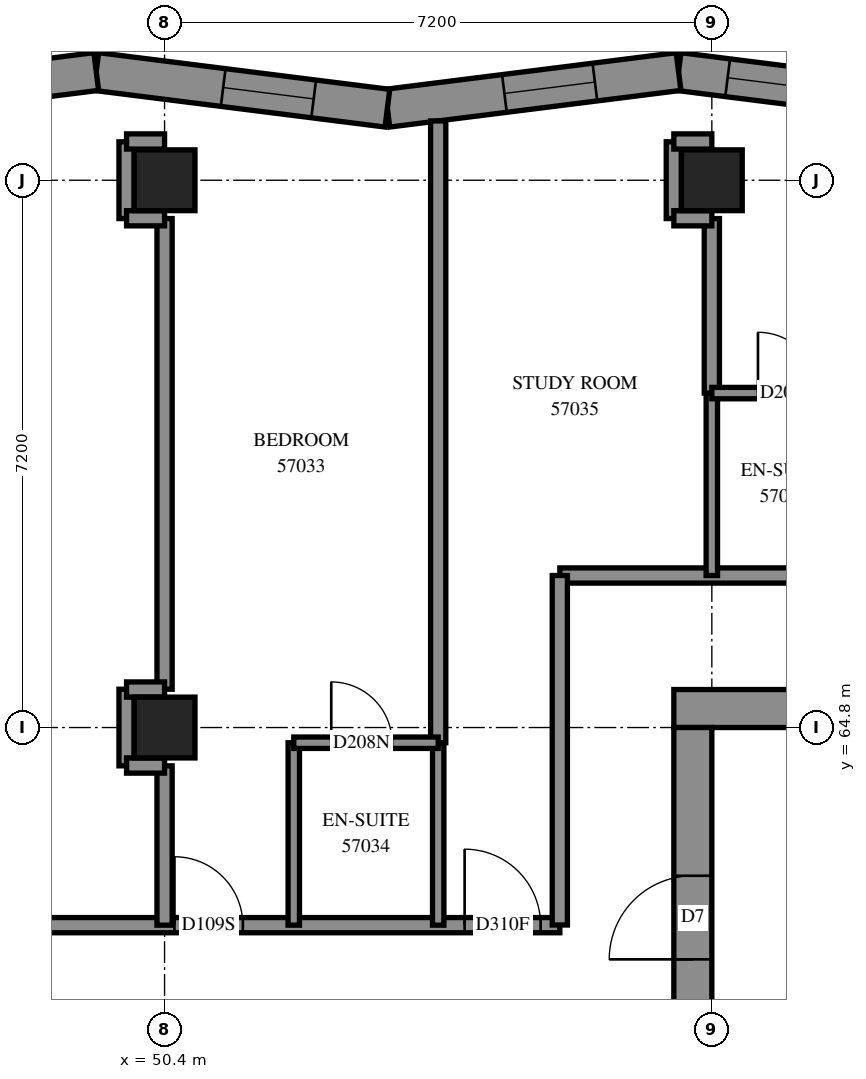
"""IFC4 building model, lengths in metres.
Left out: names, types, materials, properties, quantities, classifications, styles, units other than length and angle.
Written with IfcOpenShell. Run it as: python <this file> out.ifc"""

import sys

from ifc_helpers import new_model, si_unit, direction, frame, frame_2d, origin, origin_2d, place, context, subcontext, project, spatial, polyline, rectangle, outline, extrude, element, fill, save


model = new_model("IFC4")
c1 = context("Model", 3, precision=1e-05, world=origin(), true_north=direction((0.0, 1.0)))
c2 = subcontext(c1, "Body", "Model", "MODEL_VIEW")
j1 = project(units=[si_unit("LENGTHUNIT", "METRE"), si_unit("PLANEANGLEUNIT", "RADIAN")], contexts=[c1])
p1 = place(None, origin())
s1 = spatial("IfcSite", under=j1, at=p1, CompositionType="ELEMENT")
p2 = place(p1, origin())
s2 = spatial("IfcBuilding", under=s1, at=p2, CompositionType="ELEMENT")
p3 = place(p2, frame((0.0, 0.0, 210.0)))
s3 = spatial("IfcBuildingStorey", under=s2, at=p3, CompositionType="ELEMENT", Elevation=210.0)
for number, where, z_axis, x_axis in (
    (1, (50.4, 64.8, 0.0), (0.0, 0.0, 1.0), (1.0, 0.0, 0.0)),
    (2, (50.4, 72.0, 0.0), (0.0, 0.0, 1.0), (1.0, 0.0, 0.0)),
    (3, (57.6, 72.0, 0.0), (0.0, 0.0, 1.0), (1.0, 0.0, 0.0)),
):
    element("IfcColumn", number, at=place(p3, frame(where, z_axis=z_axis, x_axis=x_axis)), inside=s3, PredefinedType="COLUMN", context=c2, shape_type="SweptSolid", body=[
        extrude(rectangle(XDim=0.8, YDim=0.8, at=origin_2d()), origin(), (0.0, 0.0, 1.0), 3.1),
    ])
p4 = place(p3, frame((57.1, 65.05, -0.3), z_axis=(0.0, 0.0, 1.0), x_axis=(1.0, 0.0, 0.0)))
e4 = element("IfcWall", 4, at=p4, inside=s3, PredefinedType="SHEAR", context=c2, shape_type="SweptSolid", body=[
    extrude(rectangle(XDim=15.4, YDim=0.5, at=frame_2d((7.7, 0.0))), origin(), (0.0, 0.0, 1.0), 2.7),
])
p5 = place(p4, frame((10.5, 0.0, 0.3)))
e5 = element("IfcOpeningElement", 5, at=p5, cuts=e4, PredefinedType="OPENING", context=c2, shape_type="SweptSolid", body=[
    extrude(rectangle(XDim=0.8, YDim=2.1, at=frame_2d((0.4, 1.05))), frame((0.0, 0.26, 0.0), z_axis=(0.0, -1.0, 0.0), x_axis=(1.0, 0.0, 0.0)), (0.0, 0.0, 1.0), 0.52),
])
p6 = place(p3, frame((57.35, 50.4, -0.3), z_axis=(0.0, 0.0, 1.0), x_axis=(0.0, 1.0, 0.0)))
e6 = element("IfcWall", 6, at=p6, inside=s3, PredefinedType="SHEAR", context=c2, shape_type="SweptSolid", body=[
    extrude(rectangle(XDim=14.4, YDim=0.5, at=frame_2d((7.2, 0.0))), origin(), (0.0, 0.0, 1.0), 2.7),
])
p7 = place(p6, frame((4.55, 0.0, 0.3)))
e7 = element("IfcOpeningElement", 7, at=p7, cuts=e6, PredefinedType="OPENING", context=c2, shape_type="SweptSolid", body=[
    extrude(rectangle(XDim=1.1, YDim=2.1, at=frame_2d((0.55, 1.05))), frame((0.0, 0.26, 0.0), z_axis=(0.0, -1.0, 0.0), x_axis=(1.0, 0.0, 0.0)), (0.0, 0.0, 1.0), 0.52),
])
p8 = place(p6, frame((11.35, 0.0, 0.3)))
e8 = element("IfcOpeningElement", 8, at=p8, cuts=e6, PredefinedType="OPENING", context=c2, shape_type="SweptSolid", body=[
    extrude(rectangle(XDim=1.1, YDim=2.1, at=frame_2d((0.55, 1.05))), frame((0.0, 0.26, 0.0), z_axis=(0.0, -1.0, 0.0), x_axis=(1.0, 0.0, 0.0)), (0.0, 0.0, 1.0), 0.52),
])
p9 = place(p3, frame((60.993, 72.948, 0.0), z_axis=(0.0, 0.0, 1.0), x_axis=(-0.9921759282, 0.1248476171, 0.0)))
e9 = element("IfcWall", 9, at=p9, inside=s3, PredefinedType="SOLIDWALL", context=c2, shape_type="SweptSolid", body=[
    extrude(outline(polyline([(0.032, -0.25), (3.892, -0.25), (3.829, 0.25), (-0.032, 0.25), (0.032, -0.25)])), origin(), (0.0, 0.0, 1.0), 3.1),
])
p10 = place(p9, frame((0.41, 0.0, 0.45)))
e10 = element("IfcOpeningElement", 10, at=p10, cuts=e9, PredefinedType="OPENING", context=c2, shape_type="SweptSolid", body=[
    extrude(rectangle(XDim=1.3, YDim=2.5, at=frame_2d((0.65, 1.25))), frame((0.0, 0.26, 0.0), z_axis=(0.0, -1.0, 0.0), x_axis=(1.0, 0.0, 0.0)), (0.0, 0.0, 1.0), 0.52),
])
p11 = place(p9, frame((1.91, 0.0, 0.45)))
e11 = element("IfcOpeningElement", 11, at=p11, cuts=e9, PredefinedType="OPENING", context=c2, shape_type="SweptSolid", body=[
    extrude(rectangle(XDim=1.3, YDim=2.5, at=frame_2d((0.65, 1.25))), frame((0.0, 0.26, 0.0), z_axis=(0.0, -1.0, 0.0), x_axis=(1.0, 0.0, 0.0)), (0.0, 0.0, 1.0), 0.52),
])
p12 = place(p3, frame((57.162, 73.43, 0.0), z_axis=(0.0, 0.0, 1.0), x_axis=(-0.9921763319, -0.1248444087, 0.0)))
e12 = element("IfcWall", 12, at=p12, inside=s3, PredefinedType="SOLIDWALL", context=c2, shape_type="SweptSolid", body=[
    extrude(outline(polyline([(-0.032, -0.25), (3.829, -0.25), (3.892, 0.25), (0.032, 0.25), (-0.032, -0.25)])), origin(), (0.0, 0.0, 1.0), 3.1),
])
p13 = place(p12, frame((1.109, 0.0, 0.45)))
e13 = element("IfcOpeningElement", 13, at=p13, cuts=e12, PredefinedType="OPENING", context=c2, shape_type="SweptSolid", body=[
    extrude(rectangle(XDim=1.2, YDim=2.5, at=frame_2d((0.6, 1.25))), frame((0.0, 0.26, 0.0), z_axis=(0.0, -1.0, 0.0), x_axis=(1.0, 0.0, 0.0)), (0.0, 0.0, 1.0), 0.52),
])
p14 = place(p3, frame((53.332, 72.948, 0.0), z_axis=(0.0, 0.0, 1.0), x_axis=(-0.9921759282, 0.1248476171, 0.0)))
e14 = element("IfcWall", 14, at=p14, inside=s3, PredefinedType="SOLIDWALL", context=c2, shape_type="SweptSolid", body=[
    extrude(outline(polyline([(0.032, -0.25), (3.892, -0.25), (3.829, 0.25), (-0.032, 0.25), (0.032, -0.25)])), origin(), (0.0, 0.0, 1.0), 3.1),
])
p15 = place(p14, frame((0.977, 0.0, 0.45)))
e15 = element("IfcOpeningElement", 15, at=p15, cuts=e14, PredefinedType="OPENING", context=c2, shape_type="SweptSolid", body=[
    extrude(rectangle(XDim=1.2, YDim=2.5, at=frame_2d((0.6, 1.25))), frame((0.0, 0.26, 0.0), z_axis=(0.0, -1.0, 0.0), x_axis=(1.0, 0.0, 0.0)), (0.0, 0.0, 1.0), 0.52),
])
p16 = place(p3, frame((49.501, 73.43, 0.0), z_axis=(0.0, 0.0, 1.0), x_axis=(-0.9921759282, -0.1248476171, 0.0)))
e16 = element("IfcWall", 16, at=p16, inside=s3, PredefinedType="SOLIDWALL", context=c2, shape_type="SweptSolid", body=[
    extrude(outline(polyline([(-0.032, -0.25), (3.829, -0.25), (3.892, 0.25), (0.032, 0.25), (-0.032, -0.25)])), origin(), (0.0, 0.0, 1.0), 3.1),
])
p17 = place(p16, frame((0.877, 0.0, 0.45)))
e17 = element("IfcOpeningElement", 17, at=p17, cuts=e16, PredefinedType="OPENING", context=c2, shape_type="SweptSolid", body=[
    extrude(rectangle(XDim=1.2, YDim=2.5, at=frame_2d((0.6, 1.25))), frame((0.0, 0.26, 0.0), z_axis=(0.0, -1.0, 0.0), x_axis=(1.0, 0.0, 0.0)), (0.0, 0.0, 1.0), 0.52),
])
p18 = place(p3, frame((55.6, 66.8, 0.0), z_axis=(0.0, 0.0, 1.0), x_axis=(1.0, 0.0, 0.0)))
e18 = element("IfcWall", 18, at=p18, inside=s3, PredefinedType="PARTITIONING", context=c2, shape_type="SweptSolid", body=[
    extrude(rectangle(XDim=18.4, YDim=0.2, at=frame_2d((9.2, 0.0))), origin(), (0.0, 0.0, 1.0), 3.1),
])
p19 = place(p18, frame((4.25, 0.0, 0.0)))
e19 = element("IfcOpeningElement", 19, at=p19, cuts=e18, PredefinedType="OPENING", context=c2, shape_type="SweptSolid", body=[
    extrude(rectangle(XDim=0.9, YDim=2.1, at=frame_2d((0.45, 1.05))), frame((0.0, 0.11, 0.0), z_axis=(0.0, -1.0, 0.0), x_axis=(1.0, 0.0, 0.0)), (0.0, 0.0, 1.0), 0.22),
])
p20 = place(p18, frame((7.974, 0.0, 0.0)))
e20 = element("IfcOpeningElement", 20, at=p20, cuts=e18, PredefinedType="OPENING", context=c2, shape_type="SweptSolid", body=[
    extrude(rectangle(XDim=1.0, YDim=2.1, at=frame_2d((0.5, 1.05))), frame((0.0, 0.11, 0.0), z_axis=(0.0, -1.0, 0.0), x_axis=(1.0, 0.0, 0.0)), (0.0, 0.0, 1.0), 0.22),
])
p21 = place(p18, frame((13.2, 0.0, 0.0)))
e21 = element("IfcOpeningElement", 21, at=p21, cuts=e18, PredefinedType="OPENING", context=c2, shape_type="SweptSolid", body=[
    extrude(rectangle(XDim=0.9, YDim=2.1, at=frame_2d((0.45, 1.05))), frame((0.0, 0.11, 0.0), z_axis=(0.0, -1.0, 0.0), x_axis=(1.0, 0.0, 0.0)), (0.0, 0.0, 1.0), 0.22),
])
p22 = place(p3, frame((40.602, 62.2, 0.0), z_axis=(0.0, 0.0, 1.0), x_axis=(1.0, 0.0, 0.0)))
e22 = element("IfcWall", 22, at=p22, inside=s3, PredefinedType="PARTITIONING", context=c2, shape_type="SweptSolid", body=[
    extrude(rectangle(XDim=14.998, YDim=0.2, at=frame_2d((7.499, 0.0))), origin(), (0.0, 0.0, 1.0), 3.1),
])
p23 = place(p22, frame((6.308, 0.0, 0.0)))
e23 = element("IfcOpeningElement", 23, at=p23, cuts=e22, PredefinedType="OPENING", context=c2, shape_type="SweptSolid", body=[
    extrude(rectangle(XDim=1.0, YDim=2.1, at=frame_2d((0.5, 1.05))), frame((0.0, 0.11, 0.0), z_axis=(0.0, -1.0, 0.0), x_axis=(1.0, 0.0, 0.0)), (0.0, 0.0, 1.0), 0.22),
])
p24 = place(p22, frame((9.928, 0.0, 0.0)))
e24 = element("IfcOpeningElement", 24, at=p24, cuts=e22, PredefinedType="OPENING", context=c2, shape_type="SweptSolid", body=[
    extrude(rectangle(XDim=0.9, YDim=2.1, at=frame_2d((0.45, 1.05))), frame((0.0, 0.11, 0.0), z_axis=(0.0, -1.0, 0.0), x_axis=(1.0, 0.0, 0.0)), (0.0, 0.0, 1.0), 0.22),
])
p25 = place(p22, frame((13.746, 0.0, 0.0)))
e25 = element("IfcOpeningElement", 25, at=p25, cuts=e22, PredefinedType="OPENING", context=c2, shape_type="SweptSolid", body=[
    extrude(rectangle(XDim=1.0, YDim=2.1, at=frame_2d((0.5, 1.05))), frame((0.0, 0.11, 0.0), z_axis=(0.0, -1.0, 0.0), x_axis=(1.0, 0.0, 0.0)), (0.0, 0.0, 1.0), 0.22),
])
p26 = place(p3, frame((54.0, 64.6, 0.0), z_axis=(0.0, 0.0, 1.0), x_axis=(0.0, 1.0, 0.0)))
e26 = element("IfcWall", 26, at=p26, inside=s3, PredefinedType="PARTITIONING", context=c2, shape_type="SweptSolid", body=[
    extrude(rectangle(XDim=8.18, YDim=0.2, at=frame_2d((4.09, 0.0))), origin(), (0.0, 0.0, 1.0), 3.1),
])
p27 = place(p3, frame((50.4, 65.304, 0.0), z_axis=(0.0, 0.0, 1.0), x_axis=(0.0, 1.0, 0.0)))
e27 = element("IfcWall", 27, at=p27, inside=s3, PredefinedType="PARTITIONING", context=c2, shape_type="SweptSolid", body=[
    extrude(rectangle(XDim=6.192, YDim=0.2, at=frame_2d((3.096, 0.0))), origin(), (0.0, 0.0, 1.0), 3.1),
])
p28 = place(p3, frame((55.6, 62.202, 0.0), z_axis=(0.0, 0.0, 1.0), x_axis=(0.0, 1.0, 0.0)))
e28 = element("IfcWall", 28, at=p28, inside=s3, PredefinedType="PARTITIONING", context=c2, shape_type="SweptSolid", body=[
    extrude(rectangle(XDim=4.598, YDim=0.2, at=frame_2d((2.299, 0.0))), origin(), (0.0, 0.0, 1.0), 3.1),
])
for number, where, z_axis, x_axis in (
    (29, (57.6, 66.8, 0.0), (0.0, 0.0, 1.0), (0.0, 1.0, 0.0)),
    (30, (52.1, 62.2, 0.0), (0.0, 0.0, 1.0), (0.0, 1.0, 0.0)),
    (31, (54.0, 62.2, 0.0), (0.0, 0.0, 1.0), (0.0, 1.0, 0.0)),
):
    element("IfcWall", number, at=place(p3, frame(where, z_axis=z_axis, x_axis=x_axis)), inside=s3, PredefinedType="PARTITIONING", context=c2, shape_type="SweptSolid", body=[
        extrude(rectangle(XDim=2.4, YDim=0.15, at=frame_2d((1.2, 0.0))), origin(), (0.0, 0.0, 1.0), 3.1),
    ])
p29 = place(p3, frame((57.6, 69.2, 0.0), z_axis=(0.0, 0.0, 1.0), x_axis=(0.0, 1.0, 0.0)))
e32 = element("IfcWall", 32, at=p29, inside=s3, PredefinedType="PARTITIONING", context=c2, shape_type="SweptSolid", body=[
    extrude(rectangle(XDim=2.296, YDim=0.2, at=frame_2d((1.148, 0.0))), origin(), (0.0, 0.0, 1.0), 3.1),
])
p30 = place(p3, frame((50.4, 62.2, 0.0), z_axis=(0.0, 0.0, 1.0), x_axis=(0.0, 1.0, 0.0)))
e33 = element("IfcWall", 33, at=p30, inside=s3, PredefinedType="PARTITIONING", context=c2, shape_type="SweptSolid", body=[
    extrude(rectangle(XDim=2.096, YDim=0.2, at=frame_2d((1.048, 0.0))), origin(), (0.0, 0.0, 1.0), 3.1),
])
p31 = place(p3, frame((52.1, 64.6, 0.0), z_axis=(0.0, 0.0, 1.0), x_axis=(1.0, 0.0, 0.0)))
e34 = element("IfcWall", 34, at=p31, inside=s3, PredefinedType="PARTITIONING", context=c2, shape_type="SweptSolid", body=[
    extrude(rectangle(XDim=1.9, YDim=0.15, at=frame_2d((0.95, 0.0))), origin(), (0.0, 0.0, 1.0), 3.1),
])
p32 = place(p31, frame((0.493, 0.0, 0.0)))
e35 = element("IfcOpeningElement", 35, at=p32, cuts=e34, PredefinedType="OPENING", context=c2, shape_type="SweptSolid", body=[
    extrude(rectangle(XDim=0.8, YDim=2.1, at=frame_2d((0.4, 1.05))), frame((0.0, 0.085, 0.0), z_axis=(0.0, -1.0, 0.0), x_axis=(1.0, 0.0, 0.0)), (0.0, 0.0, 1.0), 0.17),
])
p33 = place(p3, frame((57.6, 69.2, 0.0), z_axis=(0.0, 0.0, 1.0), x_axis=(1.0, 0.0, 0.0)))
e36 = element("IfcWall", 36, at=p33, inside=s3, PredefinedType="PARTITIONING", context=c2, shape_type="SweptSolid", body=[
    extrude(rectangle(XDim=1.9, YDim=0.15, at=frame_2d((0.95, 0.0))), origin(), (0.0, 0.0, 1.0), 3.1),
])
p34 = place(p33, frame((0.607, 0.0, 0.0)))
e37 = element("IfcOpeningElement", 37, at=p34, cuts=e36, PredefinedType="OPENING", context=c2, shape_type="SweptSolid", body=[
    extrude(rectangle(XDim=0.8, YDim=2.1, at=frame_2d((0.4, 1.05))), frame((0.0, 0.085, 0.0), z_axis=(0.0, -1.0, 0.0), x_axis=(1.0, 0.0, 0.0)), (0.0, 0.0, 1.0), 0.17),
])
for number, where, z_axis, x_axis in (
    (38, (49.9, 71.496, 0.0), (0.0, 0.0, 1.0), (0.0, 1.0, 0.0)),
    (39, (57.1, 71.496, 0.0), (0.0, 0.0, 1.0), (0.0, 1.0, 0.0)),
):
    element("IfcWall", number, at=place(p3, frame(where, z_axis=z_axis, x_axis=x_axis)), inside=s3, PredefinedType="PARTITIONING", context=c2, shape_type="SweptSolid", body=[
        extrude(rectangle(XDim=1.01, YDim=0.2, at=frame_2d((0.505, 0.0))), origin(), (0.0, 0.0, 1.0), 3.1),
    ])
p35 = place(p3, frame((49.9, 64.296, 0.0), z_axis=(0.0, 0.0, 1.0), x_axis=(0.0, 1.0, 0.0)))
e40 = element("IfcWall", 40, at=p35, inside=s3, PredefinedType="PARTITIONING", context=c2, shape_type="SweptSolid", body=[
    extrude(rectangle(XDim=1.008, YDim=0.2, at=frame_2d((0.504, 0.0))), origin(), (0.0, 0.0, 1.0), 3.1),
])
for number, where, z_axis, x_axis in (
    (41, (49.9, 72.51, 0.0), (0.0, 0.0, 1.0), (1.0, 0.0, 0.0)),
    (42, (57.1, 72.51, 0.0), (0.0, 0.0, 1.0), (1.0, 0.0, 0.0)),
    (43, (49.9, 71.5, 0.0), (0.0, 0.0, 1.0), (1.0, 0.0, 0.0)),
    (44, (57.1, 71.5, 0.0), (0.0, 0.0, 1.0), (1.0, 0.0, 0.0)),
    (45, (49.9, 65.3, 0.0), (0.0, 0.0, 1.0), (1.0, 0.0, 0.0)),
    (46, (49.9, 64.3, 0.0), (0.0, 0.0, 1.0), (1.0, 0.0, 0.0)),
):
    element("IfcWall", number, at=place(p3, frame(where, z_axis=z_axis, x_axis=x_axis)), inside=s3, PredefinedType="PARTITIONING", context=c2, shape_type="SweptSolid", body=[
        extrude(rectangle(XDim=0.5, YDim=0.2, at=frame_2d((0.25, 0.0))), origin(), (0.0, 0.0, 1.0), 3.1),
    ])
p36 = place(p11, origin())
e47 = element("IfcWindow", 47, at=p36, inside=s3, PartitioningType="SINGLE_PANEL", PredefinedType="WINDOW", context=c2, shape_type="SweptSolid", body=[
    extrude(rectangle(XDim=1.3, YDim=2.5, at=frame_2d((0.65, 1.25))), frame((0.0, 0.18, 0.0), z_axis=(0.0, -1.0, 0.0), x_axis=(1.0, 0.0, 0.0)), (0.0, 0.0, 1.0), 0.06),
])
fill(e11, e47)
p37 = place(p13, origin())
e48 = element("IfcWindow", 48, at=p37, inside=s3, PartitioningType="SINGLE_PANEL", PredefinedType="WINDOW", context=c2, shape_type="SweptSolid", body=[
    extrude(rectangle(XDim=1.2, YDim=2.5, at=frame_2d((0.6, 1.25))), frame((0.0, 0.18, 0.0), z_axis=(0.0, -1.0, 0.0), x_axis=(1.0, 0.0, 0.0)), (0.0, 0.0, 1.0), 0.06),
])
fill(e13, e48)
p38 = place(p15, origin())
e49 = element("IfcWindow", 49, at=p38, inside=s3, PartitioningType="SINGLE_PANEL", PredefinedType="WINDOW", context=c2, shape_type="SweptSolid", body=[
    extrude(rectangle(XDim=1.2, YDim=2.5, at=frame_2d((0.6, 1.25))), frame((0.0, 0.18, 0.0), z_axis=(0.0, -1.0, 0.0), x_axis=(1.0, 0.0, 0.0)), (0.0, 0.0, 1.0), 0.06),
])
fill(e15, e49)
p39 = place(p8, origin())
e50 = element("IfcDoor", 50, at=p39, inside=s3, OperationType="SINGLE_SWING_LEFT", PredefinedType="DOOR", context=c2, shape_type="SweptSolid", body=[
    extrude(rectangle(XDim=1.1, YDim=2.1, at=frame_2d((0.55, 1.05))), frame((0.0, 0.025, 0.0), z_axis=(0.0, -1.0, 0.0), x_axis=(1.0, 0.0, 0.0)), (0.0, 0.0, 1.0), 0.05),
])
fill(e8, e50)
p40 = place(p34, origin())
e51 = element("IfcDoor", 51, at=p40, inside=s3, OperationType="SINGLE_SWING_RIGHT", PredefinedType="DOOR", context=c2, shape_type="SweptSolid", body=[
    extrude(rectangle(XDim=0.8, YDim=2.1, at=frame_2d((0.4, 1.05))), frame((0.0, 0.025, 0.0), z_axis=(0.0, -1.0, 0.0), x_axis=(1.0, 0.0, 0.0)), (0.0, 0.0, 1.0), 0.05),
])
fill(e37, e51)
p41 = place(p24, origin())
e52 = element("IfcDoor", 52, at=p41, inside=s3, OperationType="SINGLE_SWING_RIGHT", PredefinedType="DOOR", context=c2, shape_type="SweptSolid", body=[
    extrude(rectangle(XDim=0.9, YDim=2.1, at=frame_2d((0.45, 1.05))), frame((0.0, 0.025, 0.0), z_axis=(0.0, -1.0, 0.0), x_axis=(1.0, 0.0, 0.0)), (0.0, 0.0, 1.0), 0.05),
])
fill(e24, e52)
p42 = place(p32, origin())
e53 = element("IfcDoor", 53, at=p42, inside=s3, OperationType="SINGLE_SWING_RIGHT", PredefinedType="DOOR", context=c2, shape_type="SweptSolid", body=[
    extrude(rectangle(XDim=0.8, YDim=2.1, at=frame_2d((0.4, 1.05))), frame((0.0, 0.025, 0.0), z_axis=(0.0, -1.0, 0.0), x_axis=(1.0, 0.0, 0.0)), (0.0, 0.0, 1.0), 0.05),
])
fill(e35, e53)
p43 = place(p25, origin())
e54 = element("IfcDoor", 54, at=p43, inside=s3, OperationType="SINGLE_SWING_LEFT", PredefinedType="DOOR", context=c2, shape_type="SweptSolid", body=[
    extrude(rectangle(XDim=1.0, YDim=2.1, at=frame_2d((0.5, 1.05))), frame((0.0, 0.025, 0.0), z_axis=(0.0, -1.0, 0.0), x_axis=(1.0, 0.0, 0.0)), (0.0, 0.0, 1.0), 0.05),
])
fill(e25, e54)
save(model, sys.argv[1])
